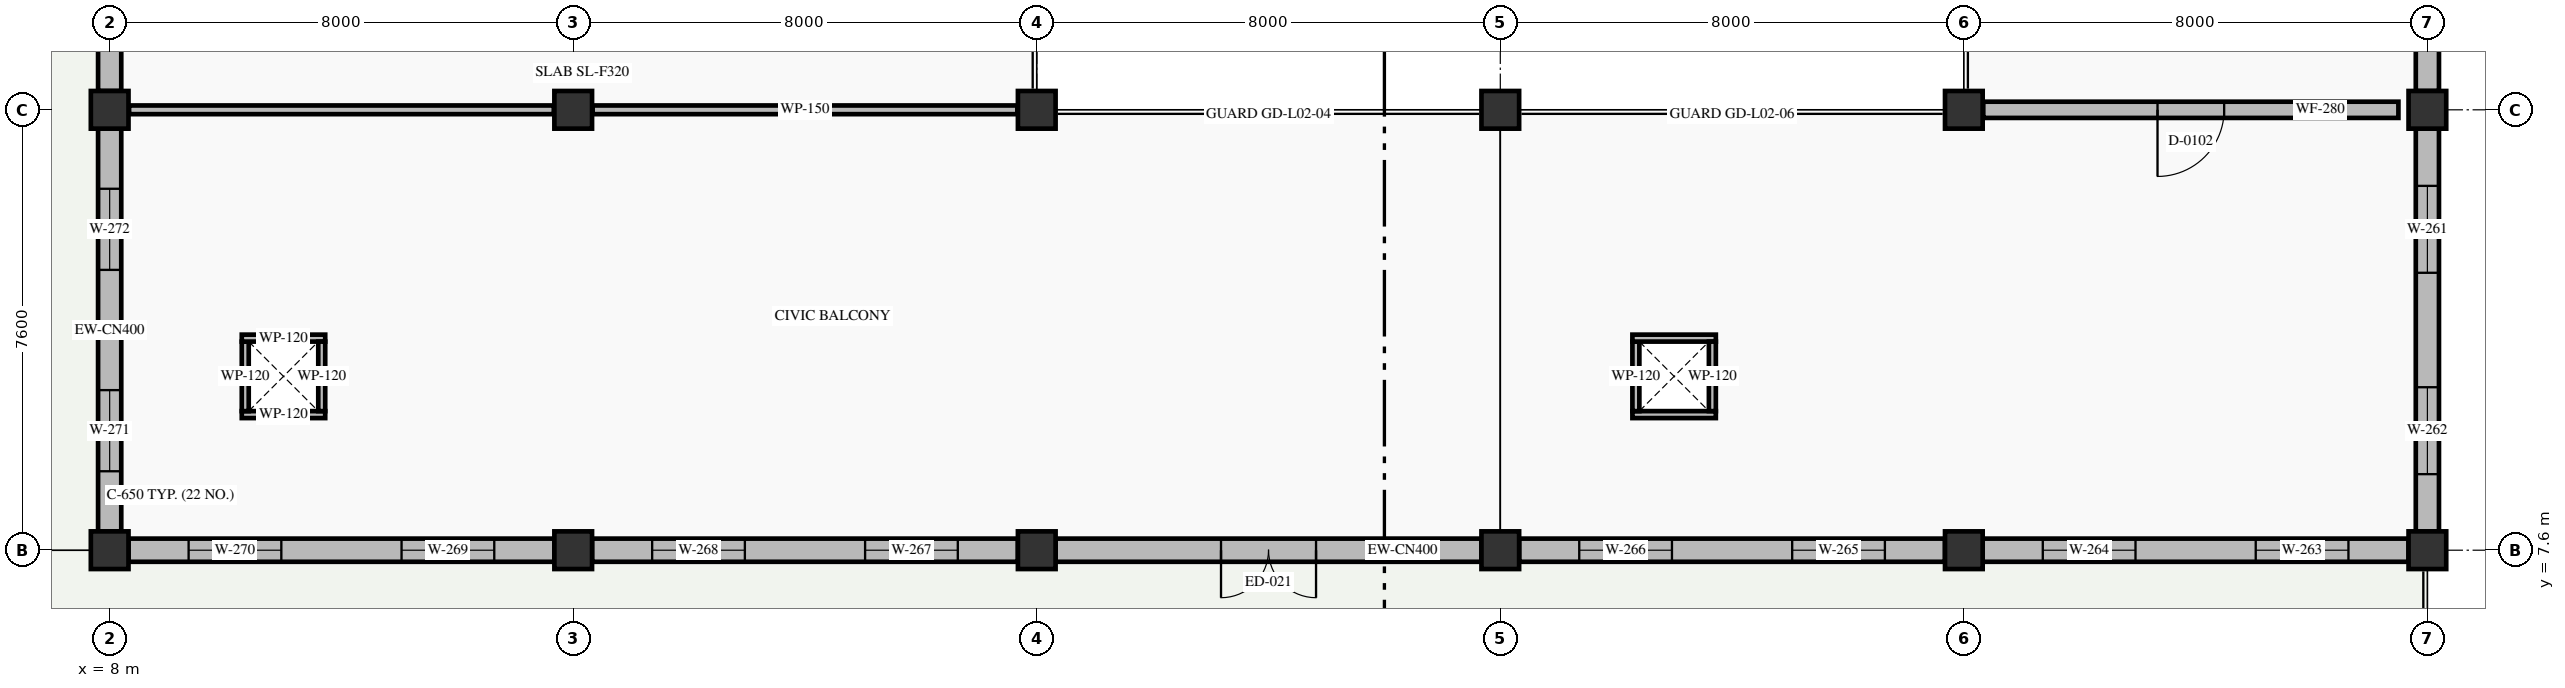
"""IFC4 building model, lengths in metres.
Left out: names, types, materials, properties, quantities, classifications, styles, units other than length and angle.
Written with IfcOpenShell. Run it as: python <this file> out.ifc"""

import sys

from ifc_helpers import new_model, si_unit, direction, frame, frame_2d, origin, origin_2d, place, context, subcontext, project, spatial, rectangle, extrude, element, fill, save


model = new_model("IFC4")
c1 = context("Model", 3, precision=1e-05, world=origin(), true_north=direction((0.0, 1.0)))
c2 = subcontext(c1, "Body", "Model", "MODEL_VIEW")
j1 = project(units=[si_unit("LENGTHUNIT", "METRE"), si_unit("PLANEANGLEUNIT", "RADIAN")], contexts=[c1])
p1 = place(None, origin())
s1 = spatial("IfcSite", under=j1, at=p1, CompositionType="ELEMENT")
p2 = place(p1, origin())
s2 = spatial("IfcBuilding", under=s1, at=p2, CompositionType="ELEMENT")
p3 = place(p2, frame((0.0, 0.0, 5.4)))
s3 = spatial("IfcBuildingStorey", under=s2, at=p3, CompositionType="ELEMENT", Elevation=5.4)
for number, where, z_axis, x_axis in (
    (1, (8.0, 7.6, 0.0), (0.0, 0.0, 1.0), (1.0, 0.0, 0.0)),
    (2, (8.0, 15.2, 0.0), (0.0, 0.0, 1.0), (1.0, 0.0, 0.0)),
    (3, (16.0, 7.6, 0.0), (0.0, 0.0, 1.0), (1.0, 0.0, 0.0)),
    (4, (16.0, 15.2, 0.0), (0.0, 0.0, 1.0), (1.0, 0.0, 0.0)),
    (5, (24.0, 7.6, 0.0), (0.0, 0.0, 1.0), (1.0, 0.0, 0.0)),
    (6, (24.0, 15.2, 0.0), (0.0, 0.0, 1.0), (1.0, 0.0, 0.0)),
    (7, (32.0, 7.6, 0.0), (0.0, 0.0, 1.0), (1.0, 0.0, 0.0)),
    (8, (32.0, 15.2, 0.0), (0.0, 0.0, 1.0), (1.0, 0.0, 0.0)),
    (9, (40.0, 7.6, 0.0), (0.0, 0.0, 1.0), (1.0, 0.0, 0.0)),
    (10, (40.0, 15.2, 0.0), (0.0, 0.0, 1.0), (1.0, 0.0, 0.0)),
    (11, (48.0, 7.6, 0.0), (0.0, 0.0, 1.0), (1.0, 0.0, 0.0)),
    (12, (48.0, 15.2, 0.0), (0.0, 0.0, 1.0), (1.0, 0.0, 0.0)),
):
    element("IfcColumn", number, at=place(p3, frame(where, z_axis=z_axis, x_axis=x_axis)), inside=s3, PredefinedType="COLUMN", context=c2, shape_type="SweptSolid", body=[
        extrude(rectangle(XDim=0.65, YDim=0.65, at=origin_2d()), origin(), (0.0, 0.0, 1.0), 4.8),
    ])
p4 = place(p3, frame((48.0, 22.475, 0.0), z_axis=(0.0, 0.0, 1.0), x_axis=(0.0, -1.0, 0.0)))
e13 = element("IfcWall", 13, at=p4, inside=s3, PredefinedType="STANDARD", context=c2, shape_type="SweptSolid", body=[
    extrude(rectangle(XDim=6.95, YDim=0.4, at=frame_2d((3.475, 0.0))), origin(), (0.0, 0.0, 1.0), 3.84),
])
p5 = place(p4, frame((2.885, 0.0, 2.4)))
e14 = element("IfcOpeningElement", 14, at=p5, cuts=e13, PredefinedType="OPENING", context=c2, shape_type="SweptSolid", body=[
    extrude(rectangle(XDim=1.18, YDim=0.92, at=frame_2d((0.59, 0.46))), frame((0.0, 0.21, 0.0), z_axis=(0.0, -1.0, 0.0), x_axis=(1.0, 0.0, 0.0)), (0.0, 0.0, 1.0), 0.42),
])
p6 = place(p3, frame((48.0, 14.875, 0.0), z_axis=(0.0, 0.0, 1.0), x_axis=(0.0, -1.0, 0.0)))
e15 = element("IfcWall", 15, at=p6, inside=s3, PredefinedType="STANDARD", context=c2, shape_type="SweptSolid", body=[
    extrude(rectangle(XDim=6.95, YDim=0.4, at=frame_2d((3.475, 0.0))), origin(), (0.0, 0.0, 1.0), 3.84),
])
p7 = place(p6, frame((0.988, 0.0, 0.9)))
e16 = element("IfcOpeningElement", 16, at=p7, cuts=e15, PredefinedType="OPENING", context=c2, shape_type="SweptSolid", body=[
    extrude(rectangle(XDim=1.5, YDim=2.15, at=frame_2d((0.75, 1.075))), frame((0.0, 0.21, 0.0), z_axis=(0.0, -1.0, 0.0), x_axis=(1.0, 0.0, 0.0)), (0.0, 0.0, 1.0), 0.42),
])
p8 = place(p6, frame((4.462, 0.0, 0.9)))
e17 = element("IfcOpeningElement", 17, at=p8, cuts=e15, PredefinedType="OPENING", context=c2, shape_type="SweptSolid", body=[
    extrude(rectangle(XDim=1.5, YDim=2.15, at=frame_2d((0.75, 1.075))), frame((0.0, 0.21, 0.0), z_axis=(0.0, -1.0, 0.0), x_axis=(1.0, 0.0, 0.0)), (0.0, 0.0, 1.0), 0.42),
])
p9 = place(p3, frame((47.675, 7.6, 0.0), z_axis=(0.0, 0.0, 1.0), x_axis=(-1.0, 0.0, 0.0)))
e18 = element("IfcWall", 18, at=p9, inside=s3, PredefinedType="STANDARD", context=c2, shape_type="SweptSolid", body=[
    extrude(rectangle(XDim=7.35, YDim=0.4, at=frame_2d((3.675, 0.0))), origin(), (0.0, 0.0, 1.0), 3.94),
])
p10 = place(p9, frame((1.038, 0.0, 0.9)))
e19 = element("IfcOpeningElement", 19, at=p10, cuts=e18, PredefinedType="OPENING", context=c2, shape_type="SweptSolid", body=[
    extrude(rectangle(XDim=1.6, YDim=2.25, at=frame_2d((0.8, 1.125))), frame((0.0, 0.21, 0.0), z_axis=(0.0, -1.0, 0.0), x_axis=(1.0, 0.0, 0.0)), (0.0, 0.0, 1.0), 0.42),
])
p11 = place(p9, frame((4.712, 0.0, 0.9)))
e20 = element("IfcOpeningElement", 20, at=p11, cuts=e18, PredefinedType="OPENING", context=c2, shape_type="SweptSolid", body=[
    extrude(rectangle(XDim=1.6, YDim=2.25, at=frame_2d((0.8, 1.125))), frame((0.0, 0.21, 0.0), z_axis=(0.0, -1.0, 0.0), x_axis=(1.0, 0.0, 0.0)), (0.0, 0.0, 1.0), 0.42),
])
p12 = place(p3, frame((39.675, 7.6, 0.0), z_axis=(0.0, 0.0, 1.0), x_axis=(-1.0, 0.0, 0.0)))
e21 = element("IfcWall", 21, at=p12, inside=s3, PredefinedType="STANDARD", context=c2, shape_type="SweptSolid", body=[
    extrude(rectangle(XDim=7.35, YDim=0.4, at=frame_2d((3.675, 0.0))), origin(), (0.0, 0.0, 1.0), 3.94),
])
p13 = place(p12, frame((1.038, 0.0, 0.9)))
e22 = element("IfcOpeningElement", 22, at=p13, cuts=e21, PredefinedType="OPENING", context=c2, shape_type="SweptSolid", body=[
    extrude(rectangle(XDim=1.6, YDim=2.25, at=frame_2d((0.8, 1.125))), frame((0.0, 0.21, 0.0), z_axis=(0.0, -1.0, 0.0), x_axis=(1.0, 0.0, 0.0)), (0.0, 0.0, 1.0), 0.42),
])
p14 = place(p12, frame((4.712, 0.0, 0.9)))
e23 = element("IfcOpeningElement", 23, at=p14, cuts=e21, PredefinedType="OPENING", context=c2, shape_type="SweptSolid", body=[
    extrude(rectangle(XDim=1.6, YDim=2.25, at=frame_2d((0.8, 1.125))), frame((0.0, 0.21, 0.0), z_axis=(0.0, -1.0, 0.0), x_axis=(1.0, 0.0, 0.0)), (0.0, 0.0, 1.0), 0.42),
])
p15 = place(p3, frame((31.675, 7.6, 0.0), z_axis=(0.0, 0.0, 1.0), x_axis=(-1.0, 0.0, 0.0)))
e24 = element("IfcWall", 24, at=p15, inside=s3, PredefinedType="STANDARD", context=c2, shape_type="SweptSolid", body=[
    extrude(rectangle(XDim=7.35, YDim=0.4, at=frame_2d((3.675, 0.0))), origin(), (0.0, 0.0, 1.0), 3.94),
])
p16 = place(p15, frame((2.855, 0.0, 0.0)))
e25 = element("IfcOpeningElement", 25, at=p16, cuts=e24, PredefinedType="OPENING", context=c2, shape_type="SweptSolid", body=[
    extrude(rectangle(XDim=1.64, YDim=2.28, at=frame_2d((0.82, 1.14))), frame((0.0, 0.21, 0.0), z_axis=(0.0, -1.0, 0.0), x_axis=(1.0, 0.0, 0.0)), (0.0, 0.0, 1.0), 0.42),
])
p17 = place(p3, frame((23.675, 7.6, 0.0), z_axis=(0.0, 0.0, 1.0), x_axis=(-1.0, 0.0, 0.0)))
e26 = element("IfcWall", 26, at=p17, inside=s3, PredefinedType="STANDARD", context=c2, shape_type="SweptSolid", body=[
    extrude(rectangle(XDim=7.35, YDim=0.4, at=frame_2d((3.675, 0.0))), origin(), (0.0, 0.0, 1.0), 3.94),
])
p18 = place(p17, frame((1.038, 0.0, 0.9)))
e27 = element("IfcOpeningElement", 27, at=p18, cuts=e26, PredefinedType="OPENING", context=c2, shape_type="SweptSolid", body=[
    extrude(rectangle(XDim=1.6, YDim=2.25, at=frame_2d((0.8, 1.125))), frame((0.0, 0.21, 0.0), z_axis=(0.0, -1.0, 0.0), x_axis=(1.0, 0.0, 0.0)), (0.0, 0.0, 1.0), 0.42),
])
p19 = place(p17, frame((4.712, 0.0, 0.9)))
e28 = element("IfcOpeningElement", 28, at=p19, cuts=e26, PredefinedType="OPENING", context=c2, shape_type="SweptSolid", body=[
    extrude(rectangle(XDim=1.6, YDim=2.25, at=frame_2d((0.8, 1.125))), frame((0.0, 0.21, 0.0), z_axis=(0.0, -1.0, 0.0), x_axis=(1.0, 0.0, 0.0)), (0.0, 0.0, 1.0), 0.42),
])
p20 = place(p3, frame((15.675, 7.6, 0.0), z_axis=(0.0, 0.0, 1.0), x_axis=(-1.0, 0.0, 0.0)))
e29 = element("IfcWall", 29, at=p20, inside=s3, PredefinedType="STANDARD", context=c2, shape_type="SweptSolid", body=[
    extrude(rectangle(XDim=7.35, YDim=0.4, at=frame_2d((3.675, 0.0))), origin(), (0.0, 0.0, 1.0), 3.94),
])
p21 = place(p20, frame((1.038, 0.0, 0.9)))
e30 = element("IfcOpeningElement", 30, at=p21, cuts=e29, PredefinedType="OPENING", context=c2, shape_type="SweptSolid", body=[
    extrude(rectangle(XDim=1.6, YDim=2.25, at=frame_2d((0.8, 1.125))), frame((0.0, 0.21, 0.0), z_axis=(0.0, -1.0, 0.0), x_axis=(1.0, 0.0, 0.0)), (0.0, 0.0, 1.0), 0.42),
])
p22 = place(p20, frame((4.712, 0.0, 0.9)))
e31 = element("IfcOpeningElement", 31, at=p22, cuts=e29, PredefinedType="OPENING", context=c2, shape_type="SweptSolid", body=[
    extrude(rectangle(XDim=1.6, YDim=2.25, at=frame_2d((0.8, 1.125))), frame((0.0, 0.21, 0.0), z_axis=(0.0, -1.0, 0.0), x_axis=(1.0, 0.0, 0.0)), (0.0, 0.0, 1.0), 0.42),
])
p23 = place(p3, frame((8.0, 7.925, 0.0), z_axis=(0.0, 0.0, 1.0), x_axis=(0.0, 1.0, 0.0)))
e32 = element("IfcWall", 32, at=p23, inside=s3, PredefinedType="STANDARD", context=c2, shape_type="SweptSolid", body=[
    extrude(rectangle(XDim=6.95, YDim=0.4, at=frame_2d((3.475, 0.0))), origin(), (0.0, 0.0, 1.0), 3.94),
])
p24 = place(p23, frame((1.038, 0.0, 0.9)))
e33 = element("IfcOpeningElement", 33, at=p24, cuts=e32, PredefinedType="OPENING", context=c2, shape_type="SweptSolid", body=[
    extrude(rectangle(XDim=1.4, YDim=2.05, at=frame_2d((0.7, 1.025))), frame((0.0, 0.21, 0.0), z_axis=(0.0, -1.0, 0.0), x_axis=(1.0, 0.0, 0.0)), (0.0, 0.0, 1.0), 0.42),
])
p25 = place(p23, frame((4.512, 0.0, 0.9)))
e34 = element("IfcOpeningElement", 34, at=p25, cuts=e32, PredefinedType="OPENING", context=c2, shape_type="SweptSolid", body=[
    extrude(rectangle(XDim=1.4, YDim=2.05, at=frame_2d((0.7, 1.025))), frame((0.0, 0.21, 0.0), z_axis=(0.0, -1.0, 0.0), x_axis=(1.0, 0.0, 0.0)), (0.0, 0.0, 1.0), 0.42),
])
p26 = place(p3, frame((8.0, 15.525, 0.0), z_axis=(0.0, 0.0, 1.0), x_axis=(0.0, 1.0, 0.0)))
e35 = element("IfcWall", 35, at=p26, inside=s3, PredefinedType="STANDARD", context=c2, shape_type="SweptSolid", body=[
    extrude(rectangle(XDim=3.175, YDim=0.4, at=frame_2d((1.587, 0.0))), origin(), (0.0, 0.0, 1.0), 3.94),
])
p27 = place(p26, frame((0.998, 0.0, 2.4)))
e36 = element("IfcOpeningElement", 36, at=p27, cuts=e35, PredefinedType="OPENING", context=c2, shape_type="SweptSolid", body=[
    extrude(rectangle(XDim=1.18, YDim=0.92, at=frame_2d((0.59, 0.46))), frame((0.0, 0.21, 0.0), z_axis=(0.0, -1.0, 0.0), x_axis=(1.0, 0.0, 0.0)), (0.0, 0.0, 1.0), 0.42),
])
p28 = place(p3, frame((11.72, 9.94, 0.0), z_axis=(0.0, 0.0, 1.0), x_axis=(-1.0, 0.0, 0.0)))
e37 = element("IfcWall", 37, at=p28, inside=s3, PredefinedType="PARTITIONING", context=c2, shape_type="SweptSolid", body=[
    extrude(rectangle(XDim=1.44, YDim=0.12, at=frame_2d((0.72, 0.0))), origin(), (0.0, 0.0, 1.0), 4.54),
])
p29 = place(p3, frame((10.34, 10.0, 0.0), z_axis=(0.0, 0.0, 1.0), x_axis=(0.0, 1.0, 0.0)))
e38 = element("IfcWall", 38, at=p29, inside=s3, PredefinedType="PARTITIONING", context=c2, shape_type="SweptSolid", body=[
    extrude(rectangle(XDim=1.2, YDim=0.12, at=frame_2d((0.6, 0.0))), origin(), (0.0, 0.0, 1.0), 4.54),
])
p30 = place(p3, frame((10.28, 11.26, 0.0), z_axis=(0.0, 0.0, 1.0), x_axis=(1.0, 0.0, 0.0)))
e39 = element("IfcWall", 39, at=p30, inside=s3, PredefinedType="PARTITIONING", context=c2, shape_type="SweptSolid", body=[
    extrude(rectangle(XDim=1.44, YDim=0.12, at=frame_2d((0.72, 0.0))), origin(), (0.0, 0.0, 1.0), 4.54),
])
p31 = place(p3, frame((11.66, 11.2, 0.0), z_axis=(0.0, 0.0, 1.0), x_axis=(0.0, -1.0, 0.0)))
e40 = element("IfcWall", 40, at=p31, inside=s3, PredefinedType="PARTITIONING", context=c2, shape_type="SweptSolid", body=[
    extrude(rectangle(XDim=1.2, YDim=0.12, at=frame_2d((0.6, 0.0))), origin(), (0.0, 0.0, 1.0), 4.54),
])
p32 = place(p3, frame((35.72, 9.94, 0.0), z_axis=(0.0, 0.0, 1.0), x_axis=(-1.0, 0.0, 0.0)))
e41 = element("IfcWall", 41, at=p32, inside=s3, PredefinedType="PARTITIONING", context=c2, shape_type="SweptSolid", body=[
    extrude(rectangle(XDim=1.44, YDim=0.12, at=frame_2d((0.72, 0.0))), origin(), (0.0, 0.0, 1.0), 4.54),
])
p33 = place(p3, frame((34.34, 10.0, 0.0), z_axis=(0.0, 0.0, 1.0), x_axis=(0.0, 1.0, 0.0)))
e42 = element("IfcWall", 42, at=p33, inside=s3, PredefinedType="PARTITIONING", context=c2, shape_type="SweptSolid", body=[
    extrude(rectangle(XDim=1.2, YDim=0.12, at=frame_2d((0.6, 0.0))), origin(), (0.0, 0.0, 1.0), 4.54),
])
p34 = place(p3, frame((34.28, 11.26, 0.0), z_axis=(0.0, 0.0, 1.0), x_axis=(1.0, 0.0, 0.0)))
e43 = element("IfcWall", 43, at=p34, inside=s3, PredefinedType="PARTITIONING", context=c2, shape_type="SweptSolid", body=[
    extrude(rectangle(XDim=1.44, YDim=0.12, at=frame_2d((0.72, 0.0))), origin(), (0.0, 0.0, 1.0), 4.54),
])
p35 = place(p3, frame((35.66, 11.2, 0.0), z_axis=(0.0, 0.0, 1.0), x_axis=(0.0, -1.0, 0.0)))
e44 = element("IfcWall", 44, at=p35, inside=s3, PredefinedType="PARTITIONING", context=c2, shape_type="SweptSolid", body=[
    extrude(rectangle(XDim=1.2, YDim=0.12, at=frame_2d((0.6, 0.0))), origin(), (0.0, 0.0, 1.0), 4.54),
])
p36 = place(p3, frame((47.5, 15.2, 0.0), z_axis=(0.0, 0.0, 1.0), x_axis=(-1.0, 0.0, 0.0)))
e45 = element("IfcWall", 45, at=p36, inside=s3, PredefinedType="STANDARD", context=c2, shape_type="SweptSolid", body=[
    extrude(rectangle(XDim=7.165, YDim=0.28, at=frame_2d((3.583, 0.0))), origin(), (0.0, 0.0, 1.0), 3.89),
])
p37 = place(p36, frame((3.008, 0.0, 0.0)))
e46 = element("IfcOpeningElement", 46, at=p37, cuts=e45, PredefinedType="OPENING", context=c2, shape_type="SweptSolid", body=[
    extrude(rectangle(XDim=1.15, YDim=2.2, at=frame_2d((0.575, 1.1))), frame((0.0, 0.15, 0.0), z_axis=(0.0, -1.0, 0.0), x_axis=(1.0, 0.0, 0.0)), (0.0, 0.0, 1.0), 0.3),
])
for number, where, z_axis, x_axis in (
    (47, (23.665, 15.2, 0.0), (0.0, 0.0, 1.0), (-1.0, 0.0, 0.0)),
    (48, (15.665, 15.2, 0.0), (0.0, 0.0, 1.0), (-1.0, 0.0, 0.0)),
):
    element("IfcWall", number, at=place(p3, frame(where, z_axis=z_axis, x_axis=x_axis)), inside=s3, PredefinedType="PARTITIONING", context=c2, shape_type="SweptSolid", body=[
        extrude(rectangle(XDim=7.33, YDim=0.15, at=frame_2d((3.665, 0.0))), origin(), (0.0, 0.0, 1.0), 3.89),
    ])
p38 = place(p7, origin())
e49 = element("IfcWindow", 49, at=p38, inside=s3, PartitioningType="DOUBLE_PANEL_VERTICAL", PredefinedType="WINDOW", context=c2, shape_type="SweptSolid", body=[
    extrude(rectangle(XDim=1.5, YDim=2.15, at=frame_2d((0.75, 1.075))), frame((0.0, 0.03, 0.0), z_axis=(0.0, -1.0, 0.0), x_axis=(1.0, 0.0, 0.0)), (0.0, 0.0, 1.0), 0.06),
])
fill(e16, e49)
p39 = place(p8, origin())
e50 = element("IfcWindow", 50, at=p39, inside=s3, PartitioningType="DOUBLE_PANEL_VERTICAL", PredefinedType="WINDOW", context=c2, shape_type="SweptSolid", body=[
    extrude(rectangle(XDim=1.5, YDim=2.15, at=frame_2d((0.75, 1.075))), frame((0.0, 0.03, 0.0), z_axis=(0.0, -1.0, 0.0), x_axis=(1.0, 0.0, 0.0)), (0.0, 0.0, 1.0), 0.06),
])
fill(e17, e50)
p40 = place(p10, origin())
e51 = element("IfcWindow", 51, at=p40, inside=s3, PartitioningType="DOUBLE_PANEL_VERTICAL", PredefinedType="WINDOW", context=c2, shape_type="SweptSolid", body=[
    extrude(rectangle(XDim=1.6, YDim=2.25, at=frame_2d((0.8, 1.125))), frame((0.0, 0.03, 0.0), z_axis=(0.0, -1.0, 0.0), x_axis=(1.0, 0.0, 0.0)), (0.0, 0.0, 1.0), 0.06),
])
fill(e19, e51)
p41 = place(p11, origin())
e52 = element("IfcWindow", 52, at=p41, inside=s3, PartitioningType="DOUBLE_PANEL_VERTICAL", PredefinedType="WINDOW", context=c2, shape_type="SweptSolid", body=[
    extrude(rectangle(XDim=1.6, YDim=2.25, at=frame_2d((0.8, 1.125))), frame((0.0, 0.03, 0.0), z_axis=(0.0, -1.0, 0.0), x_axis=(1.0, 0.0, 0.0)), (0.0, 0.0, 1.0), 0.06),
])
fill(e20, e52)
p42 = place(p13, origin())
e53 = element("IfcWindow", 53, at=p42, inside=s3, PartitioningType="DOUBLE_PANEL_VERTICAL", PredefinedType="WINDOW", context=c2, shape_type="SweptSolid", body=[
    extrude(rectangle(XDim=1.6, YDim=2.25, at=frame_2d((0.8, 1.125))), frame((0.0, 0.03, 0.0), z_axis=(0.0, -1.0, 0.0), x_axis=(1.0, 0.0, 0.0)), (0.0, 0.0, 1.0), 0.06),
])
fill(e22, e53)
p43 = place(p14, origin())
e54 = element("IfcWindow", 54, at=p43, inside=s3, PartitioningType="DOUBLE_PANEL_VERTICAL", PredefinedType="WINDOW", context=c2, shape_type="SweptSolid", body=[
    extrude(rectangle(XDim=1.6, YDim=2.25, at=frame_2d((0.8, 1.125))), frame((0.0, 0.03, 0.0), z_axis=(0.0, -1.0, 0.0), x_axis=(1.0, 0.0, 0.0)), (0.0, 0.0, 1.0), 0.06),
])
fill(e23, e54)
p44 = place(p16, origin())
e55 = element("IfcDoor", 55, at=p44, inside=s3, OperationType="DOUBLE_DOOR_SINGLE_SWING", PredefinedType="DOOR", context=c2, shape_type="SweptSolid", body=[
    extrude(rectangle(XDim=1.64, YDim=2.28, at=frame_2d((0.82, 1.14))), frame((0.0, 0.025, 0.0), z_axis=(0.0, -1.0, 0.0), x_axis=(1.0, 0.0, 0.0)), (0.0, 0.0, 1.0), 0.05),
])
fill(e25, e55)
p45 = place(p18, origin())
e56 = element("IfcWindow", 56, at=p45, inside=s3, PartitioningType="DOUBLE_PANEL_VERTICAL", PredefinedType="WINDOW", context=c2, shape_type="SweptSolid", body=[
    extrude(rectangle(XDim=1.6, YDim=2.25, at=frame_2d((0.8, 1.125))), frame((0.0, 0.03, 0.0), z_axis=(0.0, -1.0, 0.0), x_axis=(1.0, 0.0, 0.0)), (0.0, 0.0, 1.0), 0.06),
])
fill(e27, e56)
p46 = place(p19, origin())
e57 = element("IfcWindow", 57, at=p46, inside=s3, PartitioningType="DOUBLE_PANEL_VERTICAL", PredefinedType="WINDOW", context=c2, shape_type="SweptSolid", body=[
    extrude(rectangle(XDim=1.6, YDim=2.25, at=frame_2d((0.8, 1.125))), frame((0.0, 0.03, 0.0), z_axis=(0.0, -1.0, 0.0), x_axis=(1.0, 0.0, 0.0)), (0.0, 0.0, 1.0), 0.06),
])
fill(e28, e57)
p47 = place(p21, origin())
e58 = element("IfcWindow", 58, at=p47, inside=s3, PartitioningType="DOUBLE_PANEL_VERTICAL", PredefinedType="WINDOW", context=c2, shape_type="SweptSolid", body=[
    extrude(rectangle(XDim=1.6, YDim=2.25, at=frame_2d((0.8, 1.125))), frame((0.0, 0.03, 0.0), z_axis=(0.0, -1.0, 0.0), x_axis=(1.0, 0.0, 0.0)), (0.0, 0.0, 1.0), 0.06),
])
fill(e30, e58)
p48 = place(p22, origin())
e59 = element("IfcWindow", 59, at=p48, inside=s3, PartitioningType="DOUBLE_PANEL_VERTICAL", PredefinedType="WINDOW", context=c2, shape_type="SweptSolid", body=[
    extrude(rectangle(XDim=1.6, YDim=2.25, at=frame_2d((0.8, 1.125))), frame((0.0, 0.03, 0.0), z_axis=(0.0, -1.0, 0.0), x_axis=(1.0, 0.0, 0.0)), (0.0, 0.0, 1.0), 0.06),
])
fill(e31, e59)
p49 = place(p24, origin())
e60 = element("IfcWindow", 60, at=p49, inside=s3, PartitioningType="DOUBLE_PANEL_VERTICAL", PredefinedType="WINDOW", context=c2, shape_type="SweptSolid", body=[
    extrude(rectangle(XDim=1.4, YDim=2.05, at=frame_2d((0.7, 1.025))), frame((0.0, 0.03, 0.0), z_axis=(0.0, -1.0, 0.0), x_axis=(1.0, 0.0, 0.0)), (0.0, 0.0, 1.0), 0.06),
])
fill(e33, e60)
p50 = place(p25, origin())
e61 = element("IfcWindow", 61, at=p50, inside=s3, PartitioningType="DOUBLE_PANEL_VERTICAL", PredefinedType="WINDOW", context=c2, shape_type="SweptSolid", body=[
    extrude(rectangle(XDim=1.4, YDim=2.05, at=frame_2d((0.7, 1.025))), frame((0.0, 0.03, 0.0), z_axis=(0.0, -1.0, 0.0), x_axis=(1.0, 0.0, 0.0)), (0.0, 0.0, 1.0), 0.06),
])
fill(e34, e61)
p51 = place(p37, origin())
e62 = element("IfcDoor", 62, at=p51, inside=s3, OperationType="SINGLE_SWING_RIGHT", PredefinedType="DOOR", context=c2, shape_type="SweptSolid", body=[
    extrude(rectangle(XDim=1.15, YDim=2.2, at=frame_2d((0.575, 1.1))), frame((0.0, 0.025, 0.0), z_axis=(0.0, -1.0, 0.0), x_axis=(1.0, 0.0, 0.0)), (0.0, 0.0, 1.0), 0.05),
])
fill(e46, e62)
save(model, sys.argv[1])
